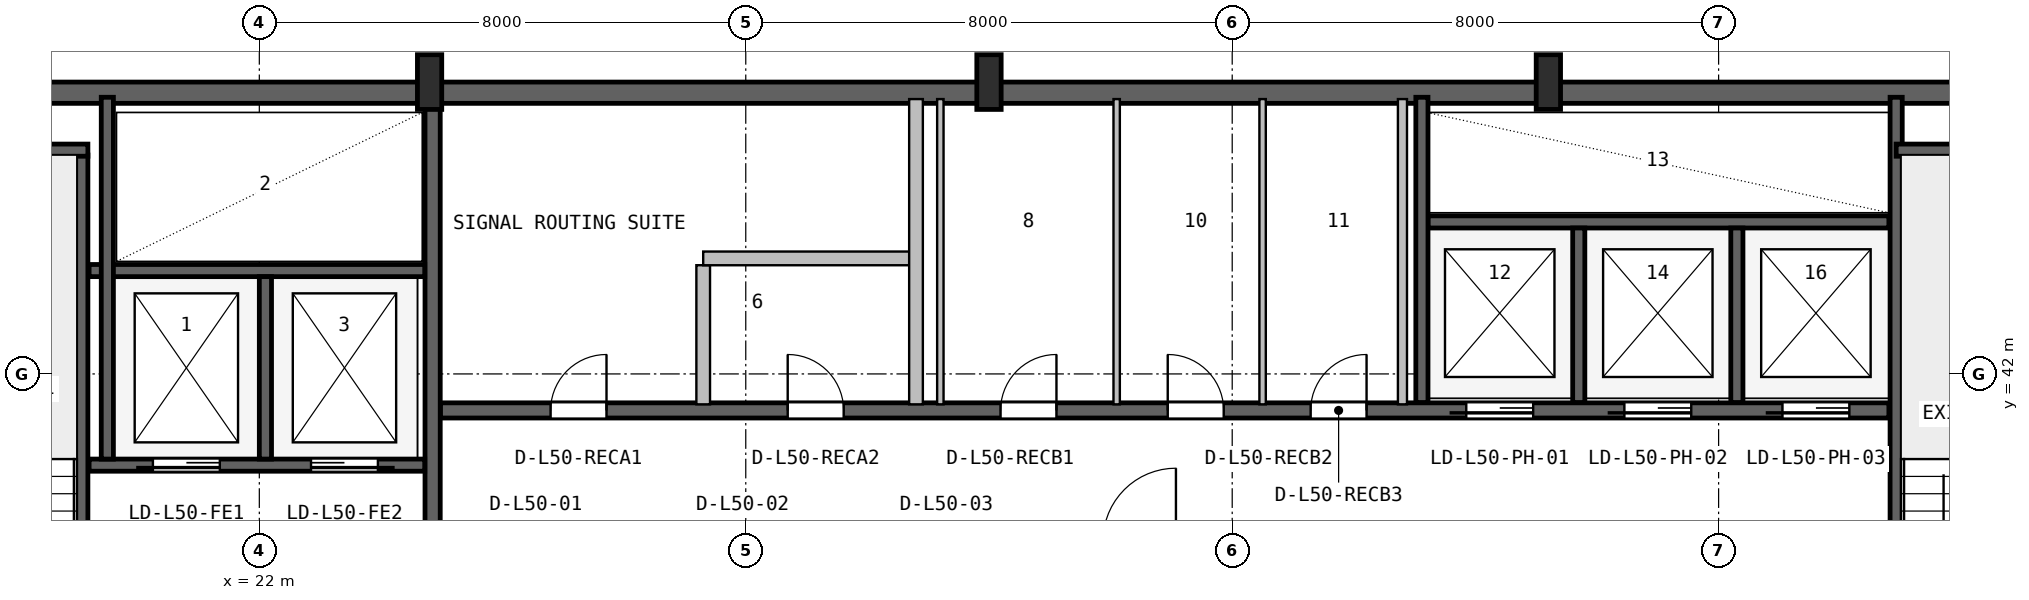
"""IFC4 building model, lengths in metres.
Left out: names, types, materials, properties, quantities, classifications, styles, units other than length and angle.
Written with IfcOpenShell. Run it as: python <this file> out.ifc"""

import sys

from ifc_helpers import new_model, si_unit, direction, frame, frame_2d, origin, origin_2d, place, context, subcontext, project, spatial, rectangle, i_section, extrude, source, transform, mapped, element, fill, save


model = new_model("IFC4")
c1 = context("Model", 3, precision=1e-05, world=origin(), true_north=direction((0.0, 1.0)))
c2 = subcontext(c1, "Body", "Model", "MODEL_VIEW")
j1 = project(units=[si_unit("LENGTHUNIT", "METRE"), si_unit("PLANEANGLEUNIT", "RADIAN")], contexts=[c1])
p1 = place(None, origin())
s1 = spatial("IfcSite", under=j1, at=p1, CompositionType="ELEMENT")
p2 = place(p1, origin())
s2 = spatial("IfcBuilding", under=s1, at=p2, CompositionType="ELEMENT")
p3 = place(p2, frame((0.0, 0.0, 203.6)))
s3 = spatial("IfcBuildingStorey", under=s2, at=p3, CompositionType="ELEMENT", Elevation=203.6)
p4 = place(p3, frame((15.6, 46.625, 0.0), z_axis=(0.0, 0.0, 1.0), x_axis=(1.0, 0.0, 0.0)))
e1 = element("IfcWall", 1, at=p4, inside=s3, PredefinedType="SHEAR", context=c2, shape_type="SweptSolid", body=[
    extrude(rectangle(XDim=36.8, YDim=0.35, at=frame_2d((18.4, 0.0))), origin(), (0.0, 0.0, 1.0), 3.55),
])
m1 = source(origin(), c2, "Body", "SweptSolid", [
    extrude(i_section(OverallWidth=0.4, OverallDepth=0.9, WebThickness=0.016, FlangeThickness=0.028, FilletRadius=0.016, at=origin_2d()), origin(), (0.0, 0.0, 1.0), 3.8),
])
for number, where, z_axis, x_axis in (
    (2, (24.8, 46.8, 0.0), (0.0, 0.0, 1.0), (1.0, 0.0, 0.0)),
    (3, (34.0, 46.8, 0.0), (0.0, 0.0, 1.0), (1.0, 0.0, 0.0)),
    (4, (43.2, 46.8, 0.0), (0.0, 0.0, 1.0), (1.0, 0.0, 0.0)),
):
    element("IfcColumn", number, at=place(p3, frame(where, z_axis=z_axis, x_axis=x_axis)), inside=s3, PredefinedType="COLUMN", context=c2, shape_type="MappedRepresentation", body=[
        mapped(m1, transform((0.0, 0.0, 0.0), x_axis=(1.0, 0.0, 0.0), y_axis=(0.0, 1.0, 0.0), z_axis=(0.0, 0.0, 1.0), scale=1.0)),
    ])
p5 = place(p3, frame((19.08, 35.95, 0.0), z_axis=(0.0, 0.0, 1.0), x_axis=(0.0, 1.0, 0.0)))
e5 = element("IfcWall", 5, at=p5, inside=s3, PredefinedType="SHEAR", context=c2, shape_type="SweptSolid", body=[
    extrude(rectangle(XDim=9.65, YDim=0.2, at=frame_2d((4.825, 0.0))), origin(), (0.0, 0.0, 1.0), 3.55),
])
p6 = place(p5, frame((0.25, 0.0, 0.0)))
e6 = element("IfcOpeningElement", 6, at=p6, cuts=e5, PredefinedType="OPENING", context=c2, shape_type="SweptSolid", body=[
    extrude(rectangle(XDim=0.95, YDim=2.1, at=frame_2d((0.475, 1.05))), frame((0.0, 0.11, 0.0), z_axis=(0.0, -1.0, 0.0), x_axis=(1.0, 0.0, 0.0)), (0.0, 0.0, 1.0), 0.22),
])
p7 = place(p3, frame((15.95, 45.68, 0.0), z_axis=(0.0, 0.0, 1.0), x_axis=(1.0, 0.0, 0.0)))
e7 = element("IfcWall", 7, at=p7, inside=s3, PredefinedType="SHEAR", context=c2, shape_type="SweptSolid", body=[
    extrude(rectangle(XDim=3.23, YDim=0.2, at=frame_2d((1.615, 0.0))), origin(), (0.0, 0.0, 1.0), 3.55),
])
p8 = place(p3, frame((24.85, 36.05, 0.0), z_axis=(0.0, 0.0, 1.0), x_axis=(0.0, 1.0, 0.0)))
e8 = element("IfcWall", 8, at=p8, inside=s3, PredefinedType="SHEAR", context=c2, shape_type="SweptSolid", body=[
    extrude(rectangle(XDim=10.45, YDim=0.25, at=frame_2d((5.225, 0.0))), origin(), (0.0, 0.0, 1.0), 3.55),
])
p9 = place(p3, frame((19.2, 40.5, 0.0), z_axis=(0.0, 0.0, 1.0), x_axis=(1.0, 0.0, 0.0)))
e9 = element("IfcWall", 9, at=p9, inside=s3, PredefinedType="SHEAR", context=c2, shape_type="SweptSolid", body=[
    extrude(rectangle(XDim=5.52, YDim=0.2, at=frame_2d((2.76, 0.0))), origin(), (0.0, 0.0, 1.0), 3.55),
])
p10 = place(p9, frame((1.05, 0.0, 0.0)))
e10 = element("IfcOpeningElement", 10, at=p10, cuts=e9, PredefinedType="OPENING", context=c2, shape_type="SweptSolid", body=[
    extrude(rectangle(XDim=1.1, YDim=2.18, at=frame_2d((0.55, 1.09))), frame((0.0, 0.11, 0.0), z_axis=(0.0, -1.0, 0.0), x_axis=(1.0, 0.0, 0.0)), (0.0, 0.0, 1.0), 0.22),
])
p11 = place(p9, frame((3.65, 0.0, 0.0)))
e11 = element("IfcOpeningElement", 11, at=p11, cuts=e9, PredefinedType="OPENING", context=c2, shape_type="SweptSolid", body=[
    extrude(rectangle(XDim=1.1, YDim=2.18, at=frame_2d((0.55, 1.09))), frame((0.0, 0.11, 0.0), z_axis=(0.0, -1.0, 0.0), x_axis=(1.0, 0.0, 0.0)), (0.0, 0.0, 1.0), 0.22),
])
p12 = place(p3, frame((19.2, 43.7, 0.0), z_axis=(0.0, 0.0, 1.0), x_axis=(1.0, 0.0, 0.0)))
e12 = element("IfcWall", 12, at=p12, inside=s3, PredefinedType="SHEAR", context=c2, shape_type="SweptSolid", body=[
    extrude(rectangle(XDim=5.52, YDim=0.2, at=frame_2d((2.76, 0.0))), origin(), (0.0, 0.0, 1.0), 3.55),
])
p13 = place(p3, frame((22.1, 40.6, 0.0), z_axis=(0.0, 0.0, 1.0), x_axis=(0.0, 1.0, 0.0)))
e13 = element("IfcWall", 13, at=p13, inside=s3, PredefinedType="SHEAR", context=c2, shape_type="SweptSolid", body=[
    extrude(rectangle(XDim=3.0, YDim=0.2, at=frame_2d((1.5, 0.0))), origin(), (0.0, 0.0, 1.0), 3.55),
])
p14 = place(p3, frame((19.5, 40.6, 0.0), z_axis=(0.0, 0.0, 1.0), x_axis=(0.0, 1.0, 0.0)))
e14 = element("IfcWall", 14, at=p14, inside=s3, PredefinedType="SHEAR", context=c2, shape_type="SweptSolid", body=[
    extrude(rectangle(XDim=5.95, YDim=0.2, at=frame_2d((2.975, 0.0))), origin(), (0.0, 0.0, 1.0), 3.55),
])
p15 = place(p3, frame((48.92, 36.05, 0.0), z_axis=(0.0, 0.0, 1.0), x_axis=(0.0, 1.0, 0.0)))
e15 = element("IfcWall", 15, at=p15, inside=s3, PredefinedType="SHEAR", context=c2, shape_type="SweptSolid", body=[
    extrude(rectangle(XDim=10.5, YDim=0.2, at=frame_2d((5.25, 0.0))), origin(), (0.0, 0.0, 1.0), 3.55),
])
p16 = place(p3, frame((48.92, 45.68, 0.0), z_axis=(0.0, 0.0, 1.0), x_axis=(1.0, 0.0, 0.0)))
e16 = element("IfcWall", 16, at=p16, inside=s3, PredefinedType="SHEAR", context=c2, shape_type="SweptSolid", body=[
    extrude(rectangle(XDim=3.18, YDim=0.2, at=frame_2d((1.59, 0.0))), origin(), (0.0, 0.0, 1.0), 3.55),
])
p17 = place(p3, frame((24.98, 41.4, 0.0), z_axis=(0.0, 0.0, 1.0), x_axis=(1.0, 0.0, 0.0)))
e17 = element("IfcWall", 17, at=p17, inside=s3, PredefinedType="SHEAR", context=c2, shape_type="SweptSolid", body=[
    extrude(rectangle(XDim=23.82, YDim=0.25, at=frame_2d((11.91, 0.0))), origin(), (0.0, 0.0, 1.0), 3.55),
])
p18 = place(p17, frame((16.87, 0.0, 0.0)))
e18 = element("IfcOpeningElement", 18, at=p18, cuts=e17, PredefinedType="OPENING", context=c2, shape_type="SweptSolid", body=[
    extrude(rectangle(XDim=1.1, YDim=2.18, at=frame_2d((0.55, 1.09))), frame((0.0, 0.135, 0.0), z_axis=(0.0, -1.0, 0.0), x_axis=(1.0, 0.0, 0.0)), (0.0, 0.0, 1.0), 0.27),
])
p19 = place(p17, frame((19.47, 0.0, 0.0)))
e19 = element("IfcOpeningElement", 19, at=p19, cuts=e17, PredefinedType="OPENING", context=c2, shape_type="SweptSolid", body=[
    extrude(rectangle(XDim=1.1, YDim=2.18, at=frame_2d((0.55, 1.09))), frame((0.0, 0.135, 0.0), z_axis=(0.0, -1.0, 0.0), x_axis=(1.0, 0.0, 0.0)), (0.0, 0.0, 1.0), 0.27),
])
p20 = place(p17, frame((22.07, 0.0, 0.0)))
e20 = element("IfcOpeningElement", 20, at=p20, cuts=e17, PredefinedType="OPENING", context=c2, shape_type="SweptSolid", body=[
    extrude(rectangle(XDim=1.1, YDim=2.18, at=frame_2d((0.55, 1.09))), frame((0.0, 0.135, 0.0), z_axis=(0.0, -1.0, 0.0), x_axis=(1.0, 0.0, 0.0)), (0.0, 0.0, 1.0), 0.27),
])
p21 = place(p17, frame((1.81, 0.0, 0.0)))
e21 = element("IfcOpeningElement", 21, at=p21, cuts=e17, PredefinedType="OPENING", context=c2, shape_type="SweptSolid", body=[
    extrude(rectangle(XDim=0.92, YDim=2.08, at=frame_2d((0.46, 1.04))), frame((0.0, 0.135, 0.0), z_axis=(0.0, -1.0, 0.0), x_axis=(1.0, 0.0, 0.0)), (0.0, 0.0, 1.0), 0.27),
])
p22 = place(p17, frame((5.71, 0.0, 0.0)))
e22 = element("IfcOpeningElement", 22, at=p22, cuts=e17, PredefinedType="OPENING", context=c2, shape_type="SweptSolid", body=[
    extrude(rectangle(XDim=0.92, YDim=2.08, at=frame_2d((0.46, 1.04))), frame((0.0, 0.135, 0.0), z_axis=(0.0, -1.0, 0.0), x_axis=(1.0, 0.0, 0.0)), (0.0, 0.0, 1.0), 0.27),
])
p23 = place(p17, frame((9.21, 0.0, 0.0)))
e23 = element("IfcOpeningElement", 23, at=p23, cuts=e17, PredefinedType="OPENING", context=c2, shape_type="SweptSolid", body=[
    extrude(rectangle(XDim=0.92, YDim=2.08, at=frame_2d((0.46, 1.04))), frame((0.0, 0.135, 0.0), z_axis=(0.0, -1.0, 0.0), x_axis=(1.0, 0.0, 0.0)), (0.0, 0.0, 1.0), 0.27),
])
p24 = place(p17, frame((11.96, 0.0, 0.0)))
e24 = element("IfcOpeningElement", 24, at=p24, cuts=e17, PredefinedType="OPENING", context=c2, shape_type="SweptSolid", body=[
    extrude(rectangle(XDim=0.92, YDim=2.08, at=frame_2d((0.46, 1.04))), frame((0.0, 0.135, 0.0), z_axis=(0.0, -1.0, 0.0), x_axis=(1.0, 0.0, 0.0)), (0.0, 0.0, 1.0), 0.27),
])
p25 = place(p17, frame((14.31, 0.0, 0.0)))
e25 = element("IfcOpeningElement", 25, at=p25, cuts=e17, PredefinedType="OPENING", context=c2, shape_type="SweptSolid", body=[
    extrude(rectangle(XDim=0.92, YDim=2.08, at=frame_2d((0.46, 1.04))), frame((0.0, 0.135, 0.0), z_axis=(0.0, -1.0, 0.0), x_axis=(1.0, 0.0, 0.0)), (0.0, 0.0, 1.0), 0.27),
])
p26 = place(p3, frame((41.22, 44.5, 0.0), z_axis=(0.0, 0.0, 1.0), x_axis=(1.0, 0.0, 0.0)))
e26 = element("IfcWall", 26, at=p26, inside=s3, PredefinedType="SHEAR", context=c2, shape_type="SweptSolid", body=[
    extrude(rectangle(XDim=7.58, YDim=0.2, at=frame_2d((3.79, 0.0))), origin(), (0.0, 0.0, 1.0), 3.55),
])
p27 = place(p3, frame((41.12, 41.53, 0.0), z_axis=(0.0, 0.0, 1.0), x_axis=(0.0, 1.0, 0.0)))
e27 = element("IfcWall", 27, at=p27, inside=s3, PredefinedType="SHEAR", context=c2, shape_type="SweptSolid", body=[
    extrude(rectangle(XDim=5.02, YDim=0.2, at=frame_2d((2.51, 0.0))), origin(), (0.0, 0.0, 1.0), 3.55),
])
for number, where, z_axis, x_axis in (
    (28, (43.7, 41.53, 0.0), (0.0, 0.0, 1.0), (0.0, 1.0, 0.0)),
    (29, (46.3, 41.53, 0.0), (0.0, 0.0, 1.0), (0.0, 1.0, 0.0)),
):
    element("IfcWall", number, at=place(p3, frame(where, z_axis=z_axis, x_axis=x_axis)), inside=s3, PredefinedType="SHEAR", context=c2, shape_type="SweptSolid", body=[
        extrude(rectangle(XDim=2.87, YDim=0.2, at=frame_2d((1.435, 0.0))), origin(), (0.0, 0.0, 1.0), 3.55),
    ])
p28 = place(p3, frame((29.3, 41.5, 0.0), z_axis=(0.0, 0.0, 1.0), x_axis=(0.0, 1.0, 0.0)))
e30 = element("IfcWall", 30, at=p28, inside=s3, PredefinedType="PARTITIONING", context=c2, shape_type="SweptSolid", body=[
    extrude(rectangle(XDim=2.288, YDim=0.225, at=frame_2d((1.144, 0.0))), origin(), (0.0, 0.0, 1.0), 3.53),
])
p29 = place(p3, frame((29.3, 43.9, 0.0), z_axis=(0.0, 0.0, 1.0), x_axis=(1.0, 0.0, 0.0)))
e31 = element("IfcWall", 31, at=p29, inside=s3, PredefinedType="PARTITIONING", context=c2, shape_type="SweptSolid", body=[
    extrude(rectangle(XDim=3.5, YDim=0.225, at=frame_2d((1.75, 0.0))), origin(), (0.0, 0.0, 1.0), 3.53),
])
p30 = place(p3, frame((32.8, 41.5, 0.0), z_axis=(0.0, 0.0, 1.0), x_axis=(0.0, 1.0, 0.0)))
e32 = element("IfcWall", 32, at=p30, inside=s3, PredefinedType="PARTITIONING", context=c2, shape_type="SweptSolid", body=[
    extrude(rectangle(XDim=5.02, YDim=0.225, at=frame_2d((2.51, 0.0))), origin(), (0.0, 0.0, 1.0), 3.53),
])
for number, where, z_axis, x_axis in (
    (33, (36.1, 41.5, 0.0), (0.0, 0.0, 1.0), (0.0, 1.0, 0.0)),
    (34, (33.2, 41.5, 0.0), (0.0, 0.0, 1.0), (0.0, 1.0, 0.0)),
    (35, (38.5, 41.5, 0.0), (0.0, 0.0, 1.0), (0.0, 1.0, 0.0)),
):
    element("IfcWall", number, at=place(p3, frame(where, z_axis=z_axis, x_axis=x_axis)), inside=s3, PredefinedType="PARTITIONING", context=c2, shape_type="SweptSolid", body=[
        extrude(rectangle(XDim=5.02, YDim=0.105, at=frame_2d((2.51, 0.0))), origin(), (0.0, 0.0, 1.0), 3.53),
    ])
p31 = place(p3, frame((40.8, 41.5, 0.0), z_axis=(0.0, 0.0, 1.0), x_axis=(0.0, 1.0, 0.0)))
e36 = element("IfcWall", 36, at=p31, inside=s3, PredefinedType="PARTITIONING", context=c2, shape_type="SweptSolid", body=[
    extrude(rectangle(XDim=5.02, YDim=0.15, at=frame_2d((2.51, 0.0))), origin(), (0.0, 0.0, 1.0), 3.53),
])
m2 = source(origin(), c2, "Body", "SweptSolid", [
    extrude(rectangle(XDim=1.1, YDim=2.18, at=frame_2d((0.55, 1.09))), frame((0.0, 0.025, 0.0), z_axis=(0.0, -1.0, 0.0), x_axis=(1.0, 0.0, 0.0)), (0.0, 0.0, 1.0), 0.05),
])
p32 = place(p10, frame((1.1, 0.0, 0.0), z_axis=(0.0, 0.0, 1.0), x_axis=(-1.0, 0.0, 0.0)))
e37 = element("IfcDoor", 37, at=p32, inside=s3, OperationType="SLIDING_TO_LEFT", PredefinedType="DOOR", context=c2, shape_type="MappedRepresentation", body=[
    mapped(m2, transform((0.0, 0.0, 0.0), x_axis=(1.0, 0.0, 0.0), y_axis=(0.0, 1.0, 0.0), z_axis=(0.0, 0.0, 1.0), scale=1.0)),
])
fill(e10, e37)
p33 = place(p11, frame((1.1, 0.0, 0.0), z_axis=(0.0, 0.0, 1.0), x_axis=(-1.0, 0.0, 0.0)))
e38 = element("IfcDoor", 38, at=p33, inside=s3, OperationType="SLIDING_TO_RIGHT", PredefinedType="DOOR", context=c2, shape_type="MappedRepresentation", body=[
    mapped(m2, transform((0.0, 0.0, 0.0), x_axis=(1.0, 0.0, 0.0), y_axis=(0.0, 1.0, 0.0), z_axis=(0.0, 0.0, 1.0), scale=1.0)),
])
fill(e11, e38)
p34 = place(p18, frame((1.1, 0.0, 0.0), z_axis=(0.0, 0.0, 1.0), x_axis=(-1.0, 0.0, 0.0)))
e39 = element("IfcDoor", 39, at=p34, inside=s3, OperationType="SLIDING_TO_LEFT", PredefinedType="DOOR", context=c2, shape_type="MappedRepresentation", body=[
    mapped(m2, transform((0.0, 0.0, 0.0), x_axis=(1.0, 0.0, 0.0), y_axis=(0.0, 1.0, 0.0), z_axis=(0.0, 0.0, 1.0), scale=1.0)),
])
fill(e18, e39)
p35 = place(p19, frame((1.1, 0.0, 0.0), z_axis=(0.0, 0.0, 1.0), x_axis=(-1.0, 0.0, 0.0)))
e40 = element("IfcDoor", 40, at=p35, inside=s3, OperationType="SLIDING_TO_LEFT", PredefinedType="DOOR", context=c2, shape_type="MappedRepresentation", body=[
    mapped(m2, transform((0.0, 0.0, 0.0), x_axis=(1.0, 0.0, 0.0), y_axis=(0.0, 1.0, 0.0), z_axis=(0.0, 0.0, 1.0), scale=1.0)),
])
fill(e19, e40)
p36 = place(p20, frame((1.1, 0.0, 0.0), z_axis=(0.0, 0.0, 1.0), x_axis=(-1.0, 0.0, 0.0)))
e41 = element("IfcDoor", 41, at=p36, inside=s3, OperationType="SLIDING_TO_LEFT", PredefinedType="DOOR", context=c2, shape_type="MappedRepresentation", body=[
    mapped(m2, transform((0.0, 0.0, 0.0), x_axis=(1.0, 0.0, 0.0), y_axis=(0.0, 1.0, 0.0), z_axis=(0.0, 0.0, 1.0), scale=1.0)),
])
fill(e20, e41)
m3 = source(origin(), c2, "Body", "SweptSolid", [
    extrude(rectangle(XDim=0.92, YDim=2.08, at=frame_2d((0.46, 1.04))), frame((0.0, 0.025, 0.0), z_axis=(0.0, -1.0, 0.0), x_axis=(1.0, 0.0, 0.0)), (0.0, 0.0, 1.0), 0.05),
])
p37 = place(p21, origin())
e42 = element("IfcDoor", 42, at=p37, inside=s3, OperationType="SINGLE_SWING_RIGHT", PredefinedType="DOOR", context=c2, shape_type="MappedRepresentation", body=[
    mapped(m3, transform((0.0, 0.0, 0.0), x_axis=(1.0, 0.0, 0.0), y_axis=(0.0, 1.0, 0.0), z_axis=(0.0, 0.0, 1.0), scale=1.0)),
])
fill(e21, e42)
p38 = place(p22, origin())
e43 = element("IfcDoor", 43, at=p38, inside=s3, OperationType="SINGLE_SWING_LEFT", PredefinedType="DOOR", context=c2, shape_type="MappedRepresentation", body=[
    mapped(m3, transform((0.0, 0.0, 0.0), x_axis=(1.0, 0.0, 0.0), y_axis=(0.0, 1.0, 0.0), z_axis=(0.0, 0.0, 1.0), scale=1.0)),
])
fill(e22, e43)
p39 = place(p23, origin())
e44 = element("IfcDoor", 44, at=p39, inside=s3, OperationType="SINGLE_SWING_RIGHT", PredefinedType="DOOR", context=c2, shape_type="MappedRepresentation", body=[
    mapped(m3, transform((0.0, 0.0, 0.0), x_axis=(1.0, 0.0, 0.0), y_axis=(0.0, 1.0, 0.0), z_axis=(0.0, 0.0, 1.0), scale=1.0)),
])
fill(e23, e44)
p40 = place(p24, origin())
e45 = element("IfcDoor", 45, at=p40, inside=s3, OperationType="SINGLE_SWING_LEFT", PredefinedType="DOOR", context=c2, shape_type="MappedRepresentation", body=[
    mapped(m3, transform((0.0, 0.0, 0.0), x_axis=(1.0, 0.0, 0.0), y_axis=(0.0, 1.0, 0.0), z_axis=(0.0, 0.0, 1.0), scale=1.0)),
])
fill(e24, e45)
p41 = place(p25, origin())
e46 = element("IfcDoor", 46, at=p41, inside=s3, OperationType="SINGLE_SWING_RIGHT", PredefinedType="DOOR", context=c2, shape_type="MappedRepresentation", body=[
    mapped(m3, transform((0.0, 0.0, 0.0), x_axis=(1.0, 0.0, 0.0), y_axis=(0.0, 1.0, 0.0), z_axis=(0.0, 0.0, 1.0), scale=1.0)),
])
fill(e25, e46)
save(model, sys.argv[1])
